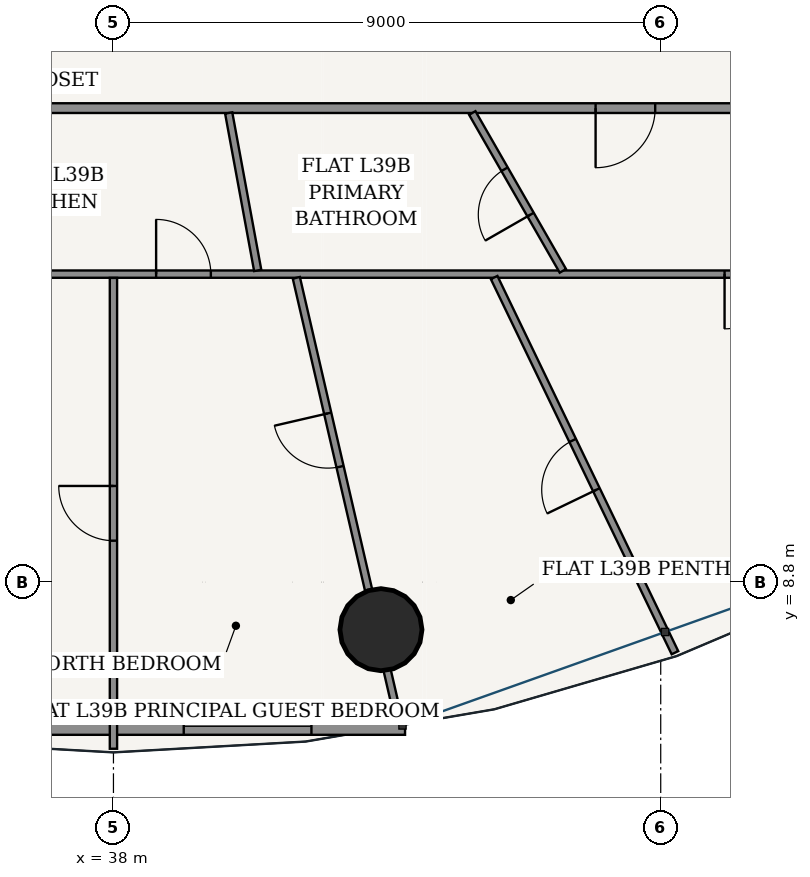
"""IFC4 building model, lengths in metres.
Left out: names, types, materials, properties, quantities, classifications, styles, units other than length and angle.
Written with IfcOpenShell. Run it as: python <this file> out.ifc"""

import sys

from ifc_helpers import new_model, si_unit, direction, frame, frame_2d, origin, origin_2d, place, context, subcontext, project, spatial, rectangle, hollow_circle, extrude, source, transform, mapped, element, fill, save


model = new_model("IFC4")
c1 = context("Model", 3, precision=1e-05, world=origin(), true_north=direction((-0.2419218956, 0.970295726276)))
c2 = subcontext(c1, "Body", "Model", "MODEL_VIEW")
j1 = project(units=[si_unit("LENGTHUNIT", "METRE"), si_unit("PLANEANGLEUNIT", "RADIAN")], contexts=[c1])
p1 = place(None, origin())
s1 = spatial("IfcSite", under=j1, at=p1, CompositionType="ELEMENT")
p2 = place(p1, origin())
s2 = spatial("IfcBuilding", under=s1, at=p2, CompositionType="ELEMENT")
p3 = place(p2, frame((0.0, 0.0, 149.8)))
s3 = spatial("IfcBuildingStorey", under=s2, at=p3, CompositionType="ELEMENT", Elevation=149.8)
p4 = place(p3, frame((42.399, 8.018, 0.0), z_axis=(0.0, 0.0, 1.0), x_axis=(1.0, 0.0, 0.0)))
e1 = element("IfcColumn", 1, at=p4, inside=s3, PredefinedType="COLUMN", context=c2, shape_type="SweptSolid", body=[
    extrude(hollow_circle(Radius=0.675, WallThickness=0.042, at=origin_2d()), origin(), (0.0, 0.0, 1.0), 3.6),
])
p5 = place(p3, frame((33.205, 6.429, 0.0), z_axis=(0.0, 0.0, 1.0), x_axis=(1.0, 0.0, 0.0)))
e2 = element("IfcWall", 2, at=p5, inside=s3, PredefinedType="SOLIDWALL", context=c2, shape_type="SweptSolid", body=[
    extrude(rectangle(XDim=9.591, YDim=0.28, at=frame_2d((4.795, 0.0))), origin(), (0.0, 0.0, 1.0), 3.33),
])
p6 = place(p5, frame((1.54, 0.0, 0.85)))
e3 = element("IfcOpeningElement", 3, at=p6, cuts=e2, PredefinedType="OPENING", context=c2, shape_type="SweptSolid", body=[
    extrude(rectangle(XDim=2.1, YDim=1.95, at=frame_2d((1.05, 0.975))), frame((0.0, 0.15, 0.0), z_axis=(0.0, -1.0, 0.0), x_axis=(1.0, 0.0, 0.0)), (0.0, 0.0, 1.0), 0.3),
])
p7 = place(p5, frame((5.951, 0.0, 0.85)))
e4 = element("IfcOpeningElement", 4, at=p7, cuts=e2, PredefinedType="OPENING", context=c2, shape_type="SweptSolid", body=[
    extrude(rectangle(XDim=2.1, YDim=1.95, at=frame_2d((1.05, 0.975))), frame((0.0, 0.15, 0.0), z_axis=(0.0, -1.0, 0.0), x_axis=(1.0, 0.0, 0.0)), (0.0, 0.0, 1.0), 0.3),
])
p8 = place(p3, frame((34.32, 16.595, 0.0), z_axis=(0.0, 0.0, 1.0), x_axis=(1.0, 0.0, 0.0)))
e5 = element("IfcWall", 5, at=p8, inside=s3, PredefinedType="PARTITIONING", context=c2, shape_type="SweptSolid", body=[
    extrude(rectangle(XDim=14.885, YDim=0.16, at=frame_2d((7.442, 0.0))), origin(), (0.0, 0.0, 1.0), 2.776),
])
p9 = place(p8, frame((11.609, 0.0, 0.0)))
e6 = element("IfcOpeningElement", 6, at=p9, cuts=e5, PredefinedType="OPENING", context=c2, shape_type="SweptSolid", body=[
    extrude(rectangle(XDim=0.98, YDim=2.2, at=frame_2d((0.49, 1.1))), frame((0.0, 0.09, 0.0), z_axis=(0.0, -1.0, 0.0), x_axis=(1.0, 0.0, 0.0)), (0.0, 0.0, 1.0), 0.18),
])
p10 = place(p3, frame((51.935, 13.865, 0.0), z_axis=(0.0, 0.0, 1.0), x_axis=(-1.0, 0.0, 0.0)))
e7 = element("IfcWall", 7, at=p10, inside=s3, PredefinedType="PARTITIONING", context=c2, shape_type="SweptSolid", body=[
    extrude(rectangle(XDim=20.345, YDim=0.12, at=frame_2d((10.172, 0.0))), origin(), (0.0, 0.0, 1.0), 2.776),
])
p11 = place(p10, frame((2.985, 0.0, 0.0)))
e8 = element("IfcOpeningElement", 8, at=p11, cuts=e7, PredefinedType="OPENING", context=c2, shape_type="SweptSolid", body=[
    extrude(rectangle(XDim=0.9, YDim=2.15, at=frame_2d((0.45, 1.075))), frame((0.0, 0.07, 0.0), z_axis=(0.0, -1.0, 0.0), x_axis=(1.0, 0.0, 0.0)), (0.0, 0.0, 1.0), 0.14),
])
p12 = place(p10, frame((12.333, 0.0, 0.0)))
e9 = element("IfcOpeningElement", 9, at=p12, cuts=e7, PredefinedType="OPENING", context=c2, shape_type="SweptSolid", body=[
    extrude(rectangle(XDim=0.9, YDim=2.15, at=frame_2d((0.45, 1.075))), frame((0.0, 0.07, 0.0), z_axis=(0.0, -1.0, 0.0), x_axis=(1.0, 0.0, 0.0)), (0.0, 0.0, 1.0), 0.14),
])
p13 = place(p10, frame((18.436, 0.0, 0.0)))
e10 = element("IfcOpeningElement", 10, at=p13, cuts=e7, PredefinedType="OPENING", context=c2, shape_type="SweptSolid", body=[
    extrude(rectangle(XDim=0.9, YDim=2.15, at=frame_2d((0.45, 1.075))), frame((0.0, 0.07, 0.0), z_axis=(0.0, -1.0, 0.0), x_axis=(1.0, 0.0, 0.0)), (0.0, 0.0, 1.0), 0.14),
])
p14 = place(p3, frame((38.0, 13.803, 0.0), z_axis=(0.0, 0.0, 1.0), x_axis=(0.0, -1.0, 0.0)))
e11 = element("IfcWall", 11, at=p14, inside=s3, PredefinedType="PARTITIONING", context=c2, shape_type="SweptSolid", body=[
    extrude(rectangle(XDim=7.743, YDim=0.12, at=frame_2d((3.872, 0.0))), origin(), (0.0, 0.0, 1.0), 2.846),
])
p15 = place(p14, frame((3.421, 0.0, 0.0)))
e12 = element("IfcOpeningElement", 12, at=p15, cuts=e11, PredefinedType="OPENING", context=c2, shape_type="SweptSolid", body=[
    extrude(rectangle(XDim=0.9, YDim=2.15, at=frame_2d((0.45, 1.075))), frame((0.0, 0.07, 0.0), z_axis=(0.0, -1.0, 0.0), x_axis=(1.0, 0.0, 0.0)), (0.0, 0.0, 1.0), 0.14),
])
p16 = place(p3, frame((41.008, 13.805, 0.0), z_axis=(0.0, 0.0, 1.0), x_axis=(0.225447000045, -0.974255433739, 0.0)))
e13 = element("IfcWall", 13, at=p16, inside=s3, PredefinedType="PARTITIONING", context=c2, shape_type="SweptSolid", body=[
    extrude(rectangle(XDim=7.496, YDim=0.12, at=frame_2d((3.748, 0.0))), origin(), (0.0, 0.0, 1.0), 2.776),
])
p17 = place(p16, frame((2.289, 0.0, 0.0)))
e14 = element("IfcOpeningElement", 14, at=p17, cuts=e13, PredefinedType="OPENING", context=c2, shape_type="SweptSolid", body=[
    extrude(rectangle(XDim=0.9, YDim=2.15, at=frame_2d((0.45, 1.075))), frame((0.0, 0.07, 0.0), z_axis=(0.0, -1.0, 0.0), x_axis=(1.0, 0.0, 0.0)), (0.0, 0.0, 1.0), 0.14),
])
p18 = place(p3, frame((44.26, 13.809, 0.0), z_axis=(0.0, 0.0, 1.0), x_axis=(0.434162832987, -0.900834410118, 0.0)))
e15 = element("IfcWall", 15, at=p18, inside=s3, PredefinedType="PARTITIONING", context=c2, shape_type="SweptSolid", body=[
    extrude(rectangle(XDim=6.849, YDim=0.12, at=frame_2d((3.425, 0.0))), origin(), (0.0, 0.0, 1.0), 2.846),
])
p19 = place(p18, frame((2.975, 0.0, 0.0)))
e16 = element("IfcOpeningElement", 16, at=p19, cuts=e15, PredefinedType="OPENING", context=c2, shape_type="SweptSolid", body=[
    extrude(rectangle(XDim=0.9, YDim=2.15, at=frame_2d((0.45, 1.075))), frame((0.0, 0.07, 0.0), z_axis=(0.0, -1.0, 0.0), x_axis=(1.0, 0.0, 0.0)), (0.0, 0.0, 1.0), 0.14),
])
p20 = place(p3, frame((39.895, 16.515, 0.0), z_axis=(0.0, 0.0, 1.0), x_axis=(0.181219081065, -0.983442751083, 0.0)))
e17 = element("IfcWall", 17, at=p20, inside=s3, PredefinedType="PARTITIONING", context=c2, shape_type="SweptSolid", body=[
    extrude(rectangle(XDim=2.633, YDim=0.12, at=frame_2d((1.316, 0.0))), origin(), (0.0, 0.0, 1.0), 3.33),
])
p21 = place(p3, frame((43.901, 16.515, 0.0), z_axis=(0.0, 0.0, 1.0), x_axis=(0.497640283609, -0.86738350695, 0.0)))
e18 = element("IfcWall", 18, at=p21, inside=s3, PredefinedType="PARTITIONING", context=c2, shape_type="SweptSolid", body=[
    extrude(rectangle(XDim=2.993, YDim=0.12, at=frame_2d((1.497, 0.0))), origin(), (0.0, 0.0, 1.0), 3.005),
])
p22 = place(p21, frame((1.067, 0.0, 0.0)))
e19 = element("IfcOpeningElement", 19, at=p22, cuts=e18, PredefinedType="OPENING", context=c2, shape_type="SweptSolid", body=[
    extrude(rectangle(XDim=0.86, YDim=2.15, at=frame_2d((0.43, 1.075))), frame((0.0, 0.07, 0.0), z_axis=(0.0, -1.0, 0.0), x_axis=(1.0, 0.0, 0.0)), (0.0, 0.0, 1.0), 0.14),
])
m1 = source(origin(), c2, "Body", "SweptSolid", [
    extrude(rectangle(XDim=2.1, YDim=1.95, at=frame_2d((1.05, 0.975))), frame((0.0, 0.03, 0.0), z_axis=(0.0, -1.0, 0.0), x_axis=(1.0, 0.0, 0.0)), (0.0, 0.0, 1.0), 0.06),
])
p23 = place(p7, origin())
e20 = element("IfcWindow", 20, at=p23, inside=s3, PartitioningType="SINGLE_PANEL", PredefinedType="WINDOW", context=c2, shape_type="MappedRepresentation", body=[
    mapped(m1, transform((0.0, 0.0, 0.0), scale=1.0)),
])
fill(e4, e20)
m2 = source(origin(), c2, "Body", "SweptSolid", [
    extrude(rectangle(XDim=0.98, YDim=2.2, at=frame_2d((0.49, 1.1))), frame((0.0, 0.025, 0.0), z_axis=(0.0, -1.0, 0.0), x_axis=(1.0, 0.0, 0.0)), (0.0, 0.0, 1.0), 0.05),
])
p24 = place(p9, frame((0.98, 0.0, 0.0), z_axis=(0.0, 0.0, 1.0), x_axis=(-1.0, 0.0, 0.0)))
e21 = element("IfcDoor", 21, at=p24, inside=s3, OperationType="SINGLE_SWING_RIGHT", PredefinedType="DOOR", context=c2, shape_type="MappedRepresentation", body=[
    mapped(m2, transform((0.0, 0.0, 0.0), scale=1.0)),
])
fill(e6, e21)
m3 = source(origin(), c2, "Body", "SweptSolid", [
    extrude(rectangle(XDim=0.86, YDim=2.15, at=frame_2d((0.43, 1.075))), frame((0.0, 0.025, 0.0), z_axis=(0.0, -1.0, 0.0), x_axis=(1.0, 0.0, 0.0)), (0.0, 0.0, 1.0), 0.05),
])
p25 = place(p22, frame((0.86, 0.0, 0.0), z_axis=(0.0, 0.0, 1.0), x_axis=(-1.0, 0.0, 0.0)))
e22 = element("IfcDoor", 22, at=p25, inside=s3, OperationType="SINGLE_SWING_LEFT", PredefinedType="DOOR", context=c2, shape_type="MappedRepresentation", body=[
    mapped(m3, transform((0.0, 0.0, 0.0), scale=1.0)),
])
fill(e19, e22)
m4 = source(origin(), c2, "Body", "SweptSolid", [
    extrude(rectangle(XDim=0.9, YDim=2.15, at=frame_2d((0.45, 1.075))), frame((0.0, 0.025, 0.0), z_axis=(0.0, -1.0, 0.0), x_axis=(1.0, 0.0, 0.0)), (0.0, 0.0, 1.0), 0.05),
])
p26 = place(p11, origin())
e23 = element("IfcDoor", 23, at=p26, inside=s3, OperationType="SINGLE_SWING_RIGHT", PredefinedType="DOOR", context=c2, shape_type="MappedRepresentation", body=[
    mapped(m4, transform((0.0, 0.0, 0.0), scale=1.0)),
])
fill(e8, e23)
p27 = place(p19, frame((0.9, 0.0, 0.0), z_axis=(0.0, 0.0, 1.0), x_axis=(-1.0, 0.0, 0.0)))
e24 = element("IfcDoor", 24, at=p27, inside=s3, OperationType="SINGLE_SWING_LEFT", PredefinedType="DOOR", context=c2, shape_type="MappedRepresentation", body=[
    mapped(m4, transform((0.0, 0.0, 0.0), scale=1.0)),
])
fill(e16, e24)
p28 = place(p17, frame((0.9, 0.0, 0.0), z_axis=(0.0, 0.0, 1.0), x_axis=(-1.0, 0.0, 0.0)))
e25 = element("IfcDoor", 25, at=p28, inside=s3, OperationType="SINGLE_SWING_RIGHT", PredefinedType="DOOR", context=c2, shape_type="MappedRepresentation", body=[
    mapped(m4, transform((0.0, 0.0, 0.0), scale=1.0)),
])
fill(e14, e25)
p29 = place(p12, frame((0.9, 0.0, 0.0), z_axis=(0.0, 0.0, 1.0), x_axis=(-1.0, 0.0, 0.0)))
e26 = element("IfcDoor", 26, at=p29, inside=s3, OperationType="SINGLE_SWING_LEFT", PredefinedType="DOOR", context=c2, shape_type="MappedRepresentation", body=[
    mapped(m4, transform((0.0, 0.0, 0.0), scale=1.0)),
])
fill(e9, e26)
p30 = place(p15, frame((0.9, 0.0, 0.0), z_axis=(0.0, 0.0, 1.0), x_axis=(-1.0, 0.0, 0.0)))
e27 = element("IfcDoor", 27, at=p30, inside=s3, OperationType="SINGLE_SWING_RIGHT", PredefinedType="DOOR", context=c2, shape_type="MappedRepresentation", body=[
    mapped(m4, transform((0.0, 0.0, 0.0), scale=1.0)),
])
fill(e12, e27)
save(model, sys.argv[1])
